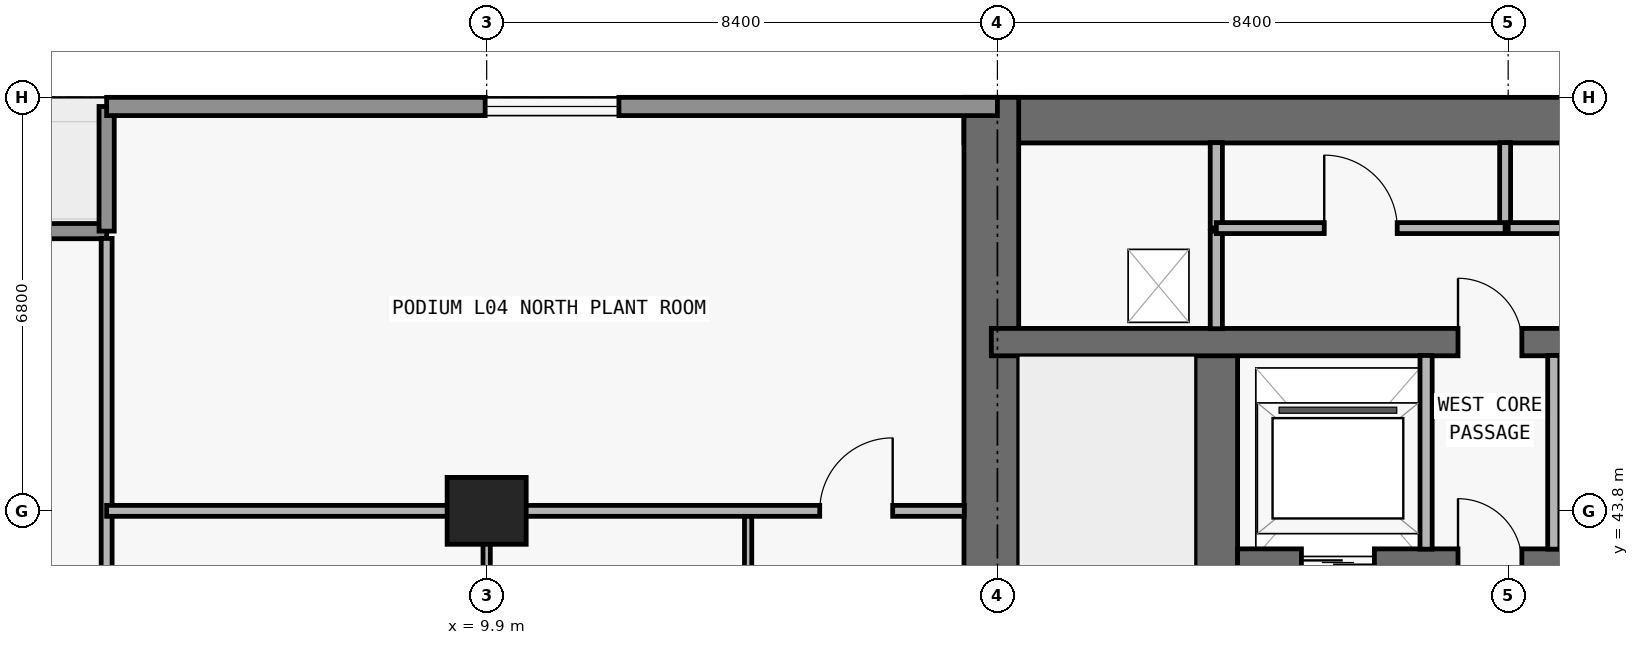
"""IFC4 building model, lengths in metres.
Left out: names, types, materials, properties, quantities, classifications, styles, units other than length and angle.
Written with IfcOpenShell. Run it as: python <this file> out.ifc"""

import sys

from ifc_helpers import new_model, si_unit, direction, frame, frame_2d, origin, origin_2d, place, context, subcontext, project, spatial, rectangle, extrude, element, fill, save


model = new_model("IFC4")
c1 = context("Model", 3, precision=1e-05, world=origin(), true_north=direction((0.0, 1.0)))
c2 = subcontext(c1, "Body", "Model", "MODEL_VIEW")
j1 = project(units=[si_unit("LENGTHUNIT", "METRE"), si_unit("PLANEANGLEUNIT", "RADIAN")], contexts=[c1])
p1 = place(None, origin())
s1 = spatial("IfcSite", under=j1, at=p1, CompositionType="ELEMENT")
p2 = place(p1, origin())
s2 = spatial("IfcBuilding", under=s1, at=p2, CompositionType="ELEMENT")
p3 = place(p2, frame((0.0, 0.0, 19.8)))
s3 = spatial("IfcBuildingStorey", under=s2, at=p3, CompositionType="ELEMENT", Elevation=19.8)
p4 = place(p3, frame((9.9, 43.8, 0.0), z_axis=(0.0, 0.0, 1.0), x_axis=(1.0, 0.0, 0.0)))
e1 = element("IfcColumn", 1, at=p4, inside=s3, PredefinedType="COLUMN", context=c2, shape_type="SweptSolid", body=[
    extrude(rectangle(XDim=1.3, YDim=1.1, at=origin_2d()), origin(), (0.0, 0.0, 1.0), 4.45),
])
p5 = place(p3, frame((17.75, 50.225, 0.0), z_axis=(0.0, 0.0, 1.0), x_axis=(1.0, 0.0, 0.0)))
e2 = element("IfcWall", 2, at=p5, inside=s3, PredefinedType="SHEAR", context=c2, shape_type="SweptSolid", body=[
    extrude(rectangle(XDim=42.3, YDim=0.75, at=frame_2d((21.15, 0.0))), origin(), (0.0, 0.0, 1.0), 4.45),
])
p6 = place(p3, frame((18.2, 36.45, 0.0), z_axis=(0.0, 0.0, 1.0), x_axis=(0.0, 1.0, 0.0)))
e3 = element("IfcWall", 3, at=p6, inside=s3, PredefinedType="SHEAR", context=c2, shape_type="SweptSolid", body=[
    extrude(rectangle(XDim=14.15, YDim=0.9, at=frame_2d((7.075, 0.0))), origin(), (0.0, 0.0, 1.0), 4.45),
])
p7 = place(p3, frame((21.9, 36.9, 0.0), z_axis=(0.0, 0.0, 1.0), x_axis=(0.0, 1.0, 0.0)))
e4 = element("IfcWall", 4, at=p7, inside=s3, PredefinedType="SHEAR", context=c2, shape_type="SweptSolid", body=[
    extrude(rectangle(XDim=9.675, YDim=0.7, at=frame_2d((4.837, 0.0))), origin(), (0.0, 0.0, 1.0), 4.45),
])
p8 = place(p7, frame((0.65, 0.0, 0.0)))
e5 = element("IfcOpeningElement", 5, at=p8, cuts=e4, PredefinedType="OPENING", context=c2, shape_type="SweptSolid", body=[
    extrude(rectangle(XDim=1.1, YDim=2.15, at=frame_2d((0.55, 1.075))), frame((0.0, 0.36, 0.0), z_axis=(0.0, -1.0, 0.0), x_axis=(1.0, 0.0, 0.0)), (0.0, 0.0, 1.0), 0.72),
])
p9 = place(p3, frame((22.25, 42.95, 0.0), z_axis=(0.0, 0.0, 1.0), x_axis=(1.0, 0.0, 0.0)))
e6 = element("IfcWall", 6, at=p9, inside=s3, PredefinedType="SHEAR", context=c2, shape_type="SweptSolid", body=[
    extrude(rectangle(XDim=33.3, YDim=0.45, at=frame_2d((16.65, 0.0))), origin(), (0.0, 0.0, 1.0), 4.45),
])
p10 = place(p9, frame((1.05, 0.0, 0.0)))
e7 = element("IfcOpeningElement", 7, at=p10, cuts=e6, PredefinedType="OPENING", context=c2, shape_type="SweptSolid", body=[
    extrude(rectangle(XDim=1.2, YDim=2.2, at=frame_2d((0.6, 1.1))), frame((0.0, 0.235, 0.0), z_axis=(0.0, -1.0, 0.0), x_axis=(1.0, 0.0, 0.0)), (0.0, 0.0, 1.0), 0.47),
])
p11 = place(p9, frame((31.05, 0.0, 0.0)))
e8 = element("IfcOpeningElement", 8, at=p11, cuts=e6, PredefinedType="OPENING", context=c2, shape_type="SweptSolid", body=[
    extrude(rectangle(XDim=1.2, YDim=2.2, at=frame_2d((0.6, 1.1))), frame((0.0, 0.235, 0.0), z_axis=(0.0, -1.0, 0.0), x_axis=(1.0, 0.0, 0.0)), (0.0, 0.0, 1.0), 0.47),
])
p12 = place(p9, frame((13.5, 0.0, 0.0)))
e9 = element("IfcOpeningElement", 9, at=p12, cuts=e6, PredefinedType="OPENING", context=c2, shape_type="SweptSolid", body=[
    extrude(rectangle(XDim=1.1, YDim=2.2, at=frame_2d((0.55, 1.1))), frame((0.0, 0.235, 0.0), z_axis=(0.0, -1.0, 0.0), x_axis=(1.0, 0.0, 0.0)), (0.0, 0.0, 1.0), 0.47),
])
p13 = place(p9, frame((16.1, 0.0, 0.0)))
e10 = element("IfcOpeningElement", 10, at=p13, cuts=e6, PredefinedType="OPENING", context=c2, shape_type="SweptSolid", body=[
    extrude(rectangle(XDim=1.1, YDim=2.2, at=frame_2d((0.55, 1.1))), frame((0.0, 0.235, 0.0), z_axis=(0.0, -1.0, 0.0), x_axis=(1.0, 0.0, 0.0)), (0.0, 0.0, 1.0), 0.47),
])
p14 = place(p9, frame((18.7, 0.0, 0.0)))
e11 = element("IfcOpeningElement", 11, at=p14, cuts=e6, PredefinedType="OPENING", context=c2, shape_type="SweptSolid", body=[
    extrude(rectangle(XDim=1.1, YDim=2.2, at=frame_2d((0.55, 1.1))), frame((0.0, 0.235, 0.0), z_axis=(0.0, -1.0, 0.0), x_axis=(1.0, 0.0, 0.0)), (0.0, 0.0, 1.0), 0.47),
])
p15 = place(p9, frame((3.625, 0.0, 0.0)))
e12 = element("IfcOpeningElement", 12, at=p15, cuts=e6, PredefinedType="OPENING", context=c2, shape_type="SweptSolid", body=[
    extrude(rectangle(XDim=1.05, YDim=2.15, at=frame_2d((0.525, 1.075))), frame((0.0, 0.235, 0.0), z_axis=(0.0, -1.0, 0.0), x_axis=(1.0, 0.0, 0.0)), (0.0, 0.0, 1.0), 0.47),
])
p16 = place(p9, frame((28.675, 0.0, 0.0)))
e13 = element("IfcOpeningElement", 13, at=p16, cuts=e6, PredefinedType="OPENING", context=c2, shape_type="SweptSolid", body=[
    extrude(rectangle(XDim=1.05, YDim=2.15, at=frame_2d((0.525, 1.075))), frame((0.0, 0.235, 0.0), z_axis=(0.0, -1.0, 0.0), x_axis=(1.0, 0.0, 0.0)), (0.0, 0.0, 1.0), 0.47),
])
p17 = place(p3, frame((18.2, 46.575, 0.0), z_axis=(0.0, 0.0, 1.0), x_axis=(1.0, 0.0, 0.0)))
e14 = element("IfcWall", 14, at=p17, inside=s3, PredefinedType="SHEAR", context=c2, shape_type="SweptSolid", body=[
    extrude(rectangle(XDim=41.4, YDim=0.45, at=frame_2d((20.7, 0.0))), origin(), (0.0, 0.0, 1.0), 4.45),
])
p18 = place(p17, frame((7.675, 0.0, 0.0)))
e15 = element("IfcOpeningElement", 15, at=p18, cuts=e14, PredefinedType="OPENING", context=c2, shape_type="SweptSolid", body=[
    extrude(rectangle(XDim=1.05, YDim=2.15, at=frame_2d((0.525, 1.075))), frame((0.0, 0.235, 0.0), z_axis=(0.0, -1.0, 0.0), x_axis=(1.0, 0.0, 0.0)), (0.0, 0.0, 1.0), 0.47),
])
p19 = place(p17, frame((32.725, 0.0, 0.0)))
e16 = element("IfcOpeningElement", 16, at=p19, cuts=e14, PredefinedType="OPENING", context=c2, shape_type="SweptSolid", body=[
    extrude(rectangle(XDim=1.05, YDim=2.15, at=frame_2d((0.525, 1.075))), frame((0.0, 0.235, 0.0), z_axis=(0.0, -1.0, 0.0), x_axis=(1.0, 0.0, 0.0)), (0.0, 0.0, 1.0), 0.47),
])
p20 = place(p3, frame((1.4, 48.4, 0.0), z_axis=(0.0, 0.0, 1.0), x_axis=(1.0, 0.0, 0.0)))
e17 = element("IfcWall", 17, at=p20, inside=s3, PredefinedType="ELEMENTEDWALL", context=c2, shape_type="SweptSolid", body=[
    extrude(rectangle(XDim=2.25, YDim=0.25, at=frame_2d((1.125, 0.0))), origin(), (0.0, 0.0, 1.0), 4.45),
])
p21 = place(p3, frame((3.65, 48.4, 0.0), z_axis=(0.0, 0.0, 1.0), x_axis=(0.0, 1.0, 0.0)))
e18 = element("IfcWall", 18, at=p21, inside=s3, PredefinedType="ELEMENTEDWALL", context=c2, shape_type="SweptSolid", body=[
    extrude(rectangle(XDim=2.05, YDim=0.25, at=frame_2d((1.025, 0.0))), origin(), (0.0, 0.0, 1.0), 4.45),
])
p22 = place(p3, frame((3.65, 50.45, 0.0), z_axis=(0.0, 0.0, 1.0), x_axis=(1.0, 0.0, 0.0)))
e19 = element("IfcWall", 19, at=p22, inside=s3, PredefinedType="STANDARD", context=c2, shape_type="SweptSolid", body=[
    extrude(rectangle(XDim=14.65, YDim=0.3, at=frame_2d((7.325, 0.0))), origin(), (0.0, 0.0, 1.0), 4.45),
])
p23 = place(p22, frame((6.225, 0.0, 0.85)))
e20 = element("IfcOpeningElement", 20, at=p23, cuts=e19, PredefinedType="OPENING", context=c2, shape_type="SweptSolid", body=[
    extrude(rectangle(XDim=2.2, YDim=1.55, at=frame_2d((1.1, 0.775))), frame((0.0, 0.16, 0.0), z_axis=(0.0, -1.0, 0.0), x_axis=(1.0, 0.0, 0.0)), (0.0, 0.0, 1.0), 0.32),
])
p24 = place(p3, frame((3.65, 22.84, 0.0), z_axis=(0.0, 0.0, 1.0), x_axis=(0.0, 1.0, 0.0)))
e21 = element("IfcWall", 21, at=p24, inside=s3, PredefinedType="PARTITIONING", context=c2, shape_type="SweptSolid", body=[
    extrude(rectangle(XDim=25.44, YDim=0.18, at=frame_2d((12.72, 0.0))), origin(), (0.0, 0.0, 1.0), 4.45),
])
p25 = place(p3, frame((9.9, 36.9, 0.0), z_axis=(0.0, 0.0, 1.0), x_axis=(0.0, 1.0, 0.0)))
e22 = element("IfcWall", 22, at=p25, inside=s3, PredefinedType="PARTITIONING", context=c2, shape_type="SweptSolid", body=[
    extrude(rectangle(XDim=6.9, YDim=0.12, at=frame_2d((3.45, 0.0))), origin(), (0.0, 0.0, 1.0), 3.414),
])
p26 = place(p3, frame((14.2, 36.9, 0.0), z_axis=(0.0, 0.0, 1.0), x_axis=(0.0, 1.0, 0.0)))
e23 = element("IfcWall", 23, at=p26, inside=s3, PredefinedType="PARTITIONING", context=c2, shape_type="SweptSolid", body=[
    extrude(rectangle(XDim=6.9, YDim=0.12, at=frame_2d((3.45, 0.0))), origin(), (0.0, 0.0, 1.0), 4.45),
])
p27 = place(p3, frame((21.9, 46.795, 0.0), z_axis=(0.0, 0.0, 1.0), x_axis=(0.0, 1.0, 0.0)))
e24 = element("IfcWall", 24, at=p27, inside=s3, PredefinedType="PARTITIONING", context=c2, shape_type="SweptSolid", body=[
    extrude(rectangle(XDim=1.605, YDim=0.2, at=frame_2d((0.802, 0.0))), origin(), (0.0, 0.0, 1.0), 4.45),
])
p28 = place(p3, frame((21.9, 48.45, 0.0), z_axis=(0.0, 0.0, 1.0), x_axis=(0.0, 1.0, 0.0)))
e25 = element("IfcWall", 25, at=p28, inside=s3, PredefinedType="PARTITIONING", context=c2, shape_type="SweptSolid", body=[
    extrude(rectangle(XDim=1.405, YDim=0.2, at=frame_2d((0.703, 0.0))), origin(), (0.0, 0.0, 1.0), 4.45),
])
p29 = place(p3, frame((25.35, 43.17, 0.0), z_axis=(0.0, 0.0, 1.0), x_axis=(0.0, 1.0, 0.0)))
e26 = element("IfcWall", 26, at=p29, inside=s3, PredefinedType="PARTITIONING", context=c2, shape_type="SweptSolid", body=[
    extrude(rectangle(XDim=3.185, YDim=0.2, at=frame_2d((1.593, 0.0))), origin(), (0.0, 0.0, 1.0), 4.45),
])
p30 = place(p3, frame((26.65, 48.45, 0.0), z_axis=(0.0, 0.0, 1.0), x_axis=(0.0, 1.0, 0.0)))
e27 = element("IfcWall", 27, at=p30, inside=s3, PredefinedType="PARTITIONING", context=c2, shape_type="SweptSolid", body=[
    extrude(rectangle(XDim=1.405, YDim=0.18, at=frame_2d((0.703, 0.0))), origin(), (0.0, 0.0, 1.0), 4.45),
])
p31 = place(p3, frame((27.45, 43.17, 0.0), z_axis=(0.0, 0.0, 1.0), x_axis=(0.0, 1.0, 0.0)))
e28 = element("IfcWall", 28, at=p31, inside=s3, PredefinedType="PARTITIONING", context=c2, shape_type="SweptSolid", body=[
    extrude(rectangle(XDim=3.185, YDim=0.2, at=frame_2d((1.593, 0.0))), origin(), (0.0, 0.0, 1.0), 4.45),
])
p32 = place(p3, frame((3.65, 43.8, 0.0), z_axis=(0.0, 0.0, 1.0), x_axis=(1.0, 0.0, 0.0)))
e29 = element("IfcWall", 29, at=p32, inside=s3, PredefinedType="PARTITIONING", context=c2, shape_type="SweptSolid", body=[
    extrude(rectangle(XDim=14.105, YDim=0.18, at=frame_2d((7.052, 0.0))), origin(), (0.0, 0.0, 1.0), 3.739),
])
p33 = place(p32, frame((11.728, 0.0, 0.0)))
e30 = element("IfcOpeningElement", 30, at=p33, cuts=e29, PredefinedType="OPENING", context=c2, shape_type="SweptSolid", body=[
    extrude(rectangle(XDim=1.2, YDim=2.2, at=frame_2d((0.6, 1.1))), frame((0.0, 0.1, 0.0), z_axis=(0.0, -1.0, 0.0), x_axis=(1.0, 0.0, 0.0)), (0.0, 0.0, 1.0), 0.2),
])
p34 = place(p3, frame((21.9, 48.45, 0.0), z_axis=(0.0, 0.0, 1.0), x_axis=(1.0, 0.0, 0.0)))
e31 = element("IfcWall", 31, at=p34, inside=s3, PredefinedType="PARTITIONING", context=c2, shape_type="SweptSolid", body=[
    extrude(rectangle(XDim=4.75, YDim=0.18, at=frame_2d((2.375, 0.0))), origin(), (0.0, 0.0, 1.0), 4.45),
])
p35 = place(p34, frame((1.775, 0.0, 0.0)))
e32 = element("IfcOpeningElement", 32, at=p35, cuts=e31, PredefinedType="OPENING", context=c2, shape_type="SweptSolid", body=[
    extrude(rectangle(XDim=1.2, YDim=2.2, at=frame_2d((0.6, 1.1))), frame((0.0, 0.1, 0.0), z_axis=(0.0, -1.0, 0.0), x_axis=(1.0, 0.0, 0.0)), (0.0, 0.0, 1.0), 0.2),
])
p36 = place(p3, frame((26.7, 48.45, 0.0), z_axis=(0.0, 0.0, 1.0), x_axis=(1.0, 0.0, 0.0)))
e33 = element("IfcWall", 33, at=p36, inside=s3, PredefinedType="PARTITIONING", context=c2, shape_type="SweptSolid", body=[
    extrude(rectangle(XDim=29.2, YDim=0.18, at=frame_2d((14.6, 0.0))), origin(), (0.0, 0.0, 1.0), 4.45),
])
p37 = place(p36, frame((1.75, 0.0, 0.0)))
e34 = element("IfcOpeningElement", 34, at=p37, cuts=e33, PredefinedType="OPENING", context=c2, shape_type="SweptSolid", body=[
    extrude(rectangle(XDim=1.2, YDim=2.2, at=frame_2d((0.6, 1.1))), frame((0.0, 0.1, 0.0), z_axis=(0.0, -1.0, 0.0), x_axis=(1.0, 0.0, 0.0)), (0.0, 0.0, 1.0), 0.2),
])
p38 = place(p36, frame((6.475, 0.0, 0.0)))
e35 = element("IfcOpeningElement", 35, at=p38, cuts=e33, PredefinedType="OPENING", context=c2, shape_type="SweptSolid", body=[
    extrude(rectangle(XDim=1.2, YDim=2.2, at=frame_2d((0.6, 1.1))), frame((0.0, 0.1, 0.0), z_axis=(0.0, -1.0, 0.0), x_axis=(1.0, 0.0, 0.0)), (0.0, 0.0, 1.0), 0.2),
])
p39 = place(p36, frame((14.05, 0.0, 0.0)))
e36 = element("IfcOpeningElement", 36, at=p39, cuts=e33, PredefinedType="OPENING", context=c2, shape_type="SweptSolid", body=[
    extrude(rectangle(XDim=1.0, YDim=2.2, at=frame_2d((0.5, 1.1))), frame((0.0, 0.1, 0.0), z_axis=(0.0, -1.0, 0.0), x_axis=(1.0, 0.0, 0.0)), (0.0, 0.0, 1.0), 0.2),
])
p40 = place(p36, frame((21.425, 0.0, 0.0)))
e37 = element("IfcOpeningElement", 37, at=p40, cuts=e33, PredefinedType="OPENING", context=c2, shape_type="SweptSolid", body=[
    extrude(rectangle(XDim=1.2, YDim=2.2, at=frame_2d((0.6, 1.1))), frame((0.0, 0.1, 0.0), z_axis=(0.0, -1.0, 0.0), x_axis=(1.0, 0.0, 0.0)), (0.0, 0.0, 1.0), 0.2),
])
p41 = place(p36, frame((26.375, 0.0, 0.0)))
e38 = element("IfcOpeningElement", 38, at=p41, cuts=e33, PredefinedType="OPENING", context=c2, shape_type="SweptSolid", body=[
    extrude(rectangle(XDim=0.85, YDim=2.1, at=frame_2d((0.425, 1.05))), frame((0.0, 0.1, 0.0), z_axis=(0.0, -1.0, 0.0), x_axis=(1.0, 0.0, 0.0)), (0.0, 0.0, 1.0), 0.2),
])
p42 = place(p23, origin())
e39 = element("IfcWindow", 39, at=p42, inside=s3, PartitioningType="SINGLE_PANEL", PredefinedType="WINDOW", context=c2, shape_type="SweptSolid", body=[
    extrude(rectangle(XDim=2.2, YDim=1.55, at=frame_2d((1.1, 0.775))), frame((0.0, 0.03, 0.0), z_axis=(0.0, -1.0, 0.0), x_axis=(1.0, 0.0, 0.0)), (0.0, 0.0, 1.0), 0.06),
])
fill(e20, e39)
p43 = place(p10, origin())
e40 = element("IfcDoor", 40, at=p43, inside=s3, OperationType="DOUBLE_DOOR_SLIDING", PredefinedType="DOOR", context=c2, shape_type="SweptSolid", body=[
    extrude(rectangle(XDim=1.2, YDim=2.2, at=frame_2d((0.6, 1.1))), frame((0.0, 0.025, 0.0), z_axis=(0.0, -1.0, 0.0), x_axis=(1.0, 0.0, 0.0)), (0.0, 0.0, 1.0), 0.05),
])
fill(e7, e40)
p44 = place(p15, origin())
e41 = element("IfcDoor", 41, at=p44, inside=s3, OperationType="SINGLE_SWING_LEFT", PredefinedType="DOOR", context=c2, shape_type="SweptSolid", body=[
    extrude(rectangle(XDim=1.05, YDim=2.15, at=frame_2d((0.525, 1.075))), frame((0.0, 0.025, 0.0), z_axis=(0.0, -1.0, 0.0), x_axis=(1.0, 0.0, 0.0)), (0.0, 0.0, 1.0), 0.05),
])
fill(e12, e41)
p45 = place(p18, origin())
e42 = element("IfcDoor", 42, at=p45, inside=s3, OperationType="SINGLE_SWING_LEFT", PredefinedType="DOOR", context=c2, shape_type="SweptSolid", body=[
    extrude(rectangle(XDim=1.05, YDim=2.15, at=frame_2d((0.525, 1.075))), frame((0.0, 0.025, 0.0), z_axis=(0.0, -1.0, 0.0), x_axis=(1.0, 0.0, 0.0)), (0.0, 0.0, 1.0), 0.05),
])
fill(e15, e42)
p46 = place(p35, origin())
e43 = element("IfcDoor", 43, at=p46, inside=s3, OperationType="SINGLE_SWING_LEFT", PredefinedType="DOOR", context=c2, shape_type="SweptSolid", body=[
    extrude(rectangle(XDim=1.2, YDim=2.2, at=frame_2d((0.6, 1.1))), frame((0.0, 0.025, 0.0), z_axis=(0.0, -1.0, 0.0), x_axis=(1.0, 0.0, 0.0)), (0.0, 0.0, 1.0), 0.05),
])
fill(e32, e43)
p47 = place(p33, origin())
e44 = element("IfcDoor", 44, at=p47, inside=s3, OperationType="SINGLE_SWING_RIGHT", PredefinedType="DOOR", context=c2, shape_type="SweptSolid", body=[
    extrude(rectangle(XDim=1.2, YDim=2.2, at=frame_2d((0.6, 1.1))), frame((0.0, 0.025, 0.0), z_axis=(0.0, -1.0, 0.0), x_axis=(1.0, 0.0, 0.0)), (0.0, 0.0, 1.0), 0.05),
])
fill(e30, e44)
save(model, sys.argv[1])
